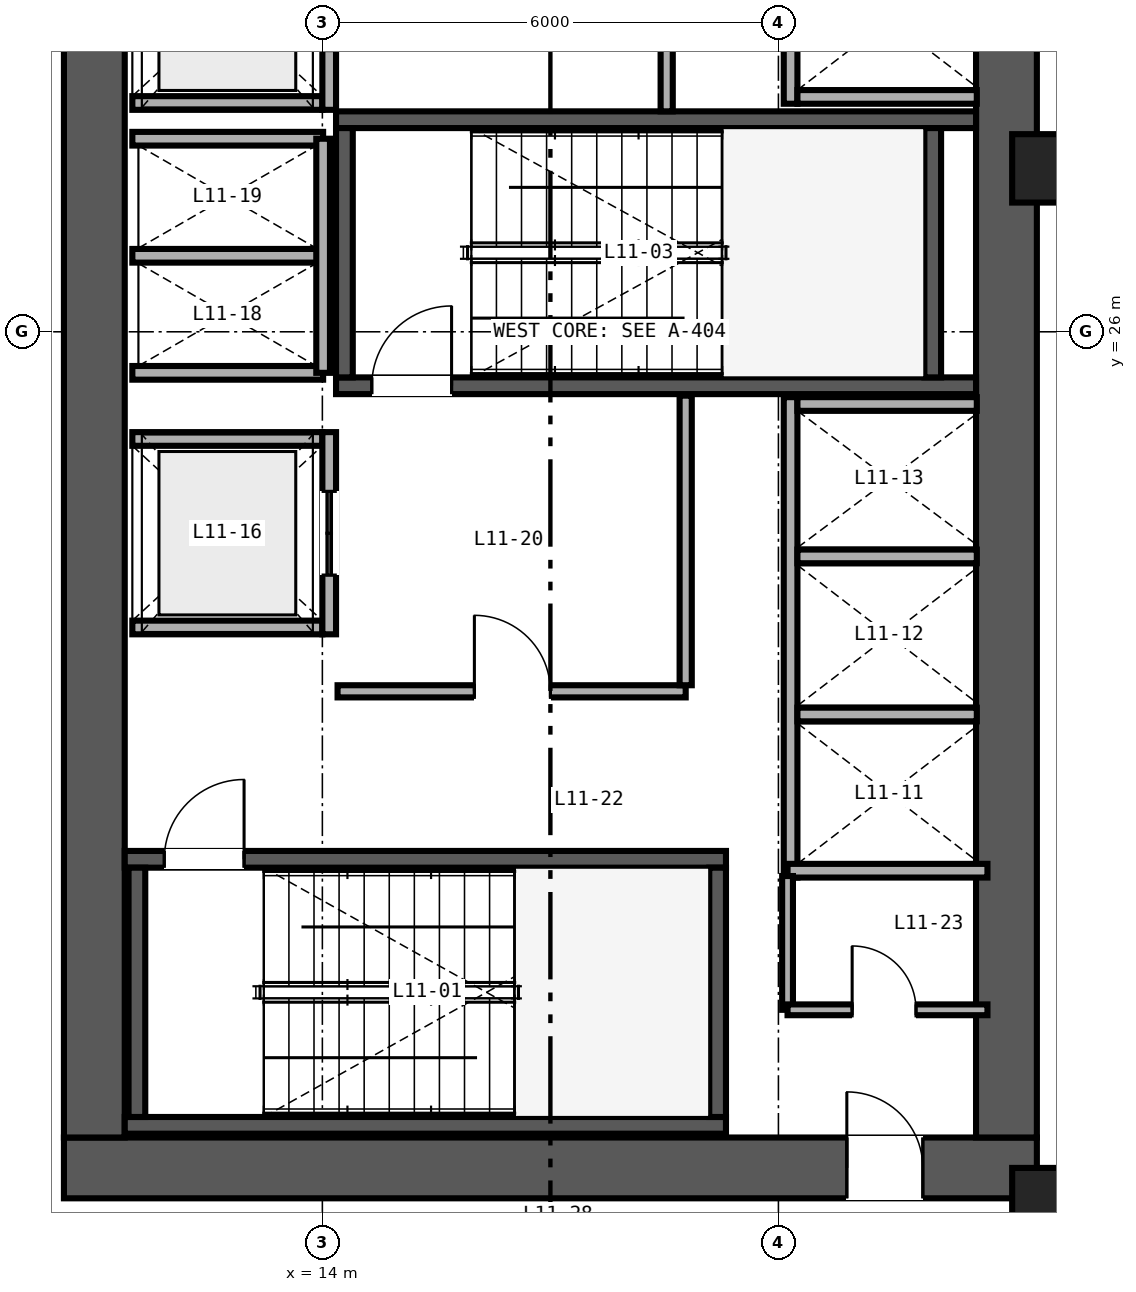
"""IFC4 building model, lengths in metres.
Left out: names, types, materials, properties, quantities, classifications, styles, units other than length and angle.
Written with IfcOpenShell. Run it as: python <this file> out.ifc"""

import sys

from ifc_helpers import new_model, si_unit, direction, frame, frame_2d, origin, origin_2d, place, context, subcontext, project, spatial, rectangle, hollow_rectangle, extrude, source, transform, mapped, element, fill, save


model = new_model("IFC4")
c1 = context("Model", 3, precision=1e-05, world=origin(), true_north=direction((0.0, 1.0)))
c2 = subcontext(c1, "Body", "Model", "MODEL_VIEW")
j1 = project(units=[si_unit("LENGTHUNIT", "METRE"), si_unit("PLANEANGLEUNIT", "RADIAN")], contexts=[c1])
p1 = place(None, origin())
s1 = spatial("IfcSite", under=j1, at=p1, CompositionType="ELEMENT")
p2 = place(p1, origin())
s2 = spatial("IfcBuilding", under=s1, at=p2, CompositionType="ELEMENT")
p3 = place(p2, frame((0.0, 0.0, 49.2)))
s3 = spatial("IfcBuildingStorey", under=s2, at=p3, CompositionType="ELEMENT", Elevation=49.2)
p4 = place(p3, frame((10.6, 15.0, 0.0), z_axis=(0.0, 0.0, 1.0), x_axis=(1.0, 0.0, 0.0)))
e1 = element("IfcWall", 1, at=p4, inside=s3, PredefinedType="SHEAR", context=c2, shape_type="SweptSolid", body=[
    extrude(rectangle(XDim=12.8, YDim=0.8, at=frame_2d((6.4, 0.0))), origin(), (0.0, 0.0, 1.0), 3.35),
])
p5 = place(p4, frame((10.3, 0.0, 0.0)))
e2 = element("IfcOpeningElement", 2, at=p5, cuts=e1, PredefinedType="OPENING", context=c2, shape_type="SweptSolid", body=[
    extrude(rectangle(XDim=1.0, YDim=2.15, at=frame_2d((0.5, 1.075))), frame((0.0, 0.41, 0.0), z_axis=(0.0, -1.0, 0.0), x_axis=(1.0, 0.0, 0.0)), (0.0, 0.0, 1.0), 0.82),
])
for number, where, z_axis, x_axis in (
    (3, (11.0, 15.4, 0.0), (0.0, 0.0, 1.0), (0.0, 1.0, 0.0)),
    (4, (23.0, 15.4, 0.0), (0.0, 0.0, 1.0), (0.0, 1.0, 0.0)),
):
    element("IfcWall", number, at=place(p3, frame(where, z_axis=z_axis, x_axis=x_axis)), inside=s3, PredefinedType="SHEAR", context=c2, shape_type="SweptSolid", body=[
        extrude(rectangle(XDim=21.2, YDim=0.8, at=frame_2d((10.6, 0.0))), origin(), (0.0, 0.0, 1.0), 3.35),
    ])
p6 = place(p3, frame((11.4, 15.56, 0.0), z_axis=(0.0, 0.0, 1.0), x_axis=(1.0, 0.0, 0.0)))
e5 = element("IfcWall", 5, at=p6, inside=s3, PredefinedType="SHEAR", context=c2, shape_type="SweptSolid", body=[
    extrude(rectangle(XDim=7.91, YDim=0.22, at=frame_2d((3.955, 0.0))), origin(), (0.0, 0.0, 1.0), 3.4),
])
p7 = place(p3, frame((11.4, 19.06, 0.0), z_axis=(0.0, 0.0, 1.0), x_axis=(1.0, 0.0, 0.0)))
e6 = element("IfcWall", 6, at=p7, inside=s3, PredefinedType="SHEAR", context=c2, shape_type="SweptSolid", body=[
    extrude(rectangle(XDim=7.91, YDim=0.22, at=frame_2d((3.955, 0.0))), origin(), (0.0, 0.0, 1.0), 3.4),
])
p8 = place(p7, frame((0.52, 0.0, 0.0)))
e7 = element("IfcOpeningElement", 7, at=p8, cuts=e6, PredefinedType="OPENING", context=c2, shape_type="SweptSolid", body=[
    extrude(rectangle(XDim=1.05, YDim=2.15, at=frame_2d((0.525, 1.075))), frame((0.0, 0.12, 0.0), z_axis=(0.0, -1.0, 0.0), x_axis=(1.0, 0.0, 0.0)), (0.0, 0.0, 1.0), 0.24),
])
for number, where, z_axis, x_axis in (
    (8, (11.56, 15.67, 0.0), (0.0, 0.0, 1.0), (0.0, 1.0, 0.0)),
    (9, (19.2, 15.67, 0.0), (0.0, 0.0, 1.0), (0.0, 1.0, 0.0)),
):
    element("IfcWall", number, at=place(p3, frame(where, z_axis=z_axis, x_axis=x_axis)), inside=s3, PredefinedType="SHEAR", context=c2, shape_type="SweptSolid", body=[
        extrude(rectangle(XDim=3.28, YDim=0.22, at=frame_2d((1.64, 0.0))), origin(), (0.0, 0.0, 1.0), 3.4),
    ])
p9 = place(p3, frame((14.18, 25.29, 0.0), z_axis=(0.0, 0.0, 1.0), x_axis=(1.0, 0.0, 0.0)))
e10 = element("IfcWall", 10, at=p9, inside=s3, PredefinedType="SHEAR", context=c2, shape_type="SweptSolid", body=[
    extrude(rectangle(XDim=8.42, YDim=0.22, at=frame_2d((4.21, 0.0))), origin(), (0.0, 0.0, 1.0), 3.4),
])
p10 = place(p9, frame((0.47, 0.0, 0.0)))
e11 = element("IfcOpeningElement", 11, at=p10, cuts=e10, PredefinedType="OPENING", context=c2, shape_type="SweptSolid", body=[
    extrude(rectangle(XDim=1.05, YDim=2.15, at=frame_2d((0.525, 1.075))), frame((0.0, 0.12, 0.0), z_axis=(0.0, -1.0, 0.0), x_axis=(1.0, 0.0, 0.0)), (0.0, 0.0, 1.0), 0.24),
])
p11 = place(p3, frame((14.18, 28.79, 0.0), z_axis=(0.0, 0.0, 1.0), x_axis=(1.0, 0.0, 0.0)))
e12 = element("IfcWall", 12, at=p11, inside=s3, PredefinedType="SHEAR", context=c2, shape_type="SweptSolid", body=[
    extrude(rectangle(XDim=8.42, YDim=0.22, at=frame_2d((4.21, 0.0))), origin(), (0.0, 0.0, 1.0), 3.4),
])
for number, where, z_axis, x_axis in (
    (13, (14.29, 25.4, 0.0), (0.0, 0.0, 1.0), (0.0, 1.0, 0.0)),
    (14, (22.03, 25.4, 0.0), (0.0, 0.0, 1.0), (0.0, 1.0, 0.0)),
):
    element("IfcWall", number, at=place(p3, frame(where, z_axis=z_axis, x_axis=x_axis)), inside=s3, PredefinedType="SHEAR", context=c2, shape_type="SweptSolid", body=[
        extrude(rectangle(XDim=3.28, YDim=0.22, at=frame_2d((1.64, 0.0))), origin(), (0.0, 0.0, 1.0), 3.4),
    ])
m1 = source(origin(), c2, "Body", "SweptSolid", [
    extrude(hollow_rectangle(XDim=0.85, YDim=0.9, WallThickness=0.04, at=origin_2d()), origin(), (0.0, 0.0, 1.0), 3.35),
])
for number, where, z_axis, x_axis in (
    (15, (23.5, 14.55, 0.0), (0.0, 0.0, 1.0), (1.0, 0.0, 0.0)),
    (16, (23.5, 28.15, 0.0), (0.0, 0.0, 1.0), (1.0, 0.0, 0.0)),
):
    element("IfcColumn", number, at=place(p3, frame(where, z_axis=z_axis, x_axis=x_axis)), inside=s3, PredefinedType="COLUMN", context=c2, shape_type="MappedRepresentation", body=[
        mapped(m1, transform((0.0, 0.0, 0.0), scale=1.0)),
    ])
p12 = place(p3, frame((20.16, 18.82, 0.0), z_axis=(0.0, 0.0, 1.0), x_axis=(0.0, 1.0, 0.0)))
e17 = element("IfcWall", 17, at=p12, inside=s3, PredefinedType="SOLIDWALL", context=c2, shape_type="SweptSolid", body=[
    extrude(rectangle(XDim=6.32, YDim=0.18, at=frame_2d((3.16, 0.0))), origin(), (0.0, 0.0, 1.0), 2.36),
])
p13 = place(p3, frame((20.12, 18.91, 0.0), z_axis=(0.0, 0.0, 1.0), x_axis=(1.0, 0.0, 0.0)))
e18 = element("IfcWall", 18, at=p13, inside=s3, PredefinedType="SOLIDWALL", context=c2, shape_type="SweptSolid", body=[
    extrude(rectangle(XDim=2.63, YDim=0.18, at=frame_2d((1.315, 0.0))), origin(), (0.0, 0.0, 1.0), 3.35),
])
p14 = place(p3, frame((20.25, 25.05, 0.0), z_axis=(0.0, 0.0, 1.0), x_axis=(1.0, 0.0, 0.0)))
e19 = element("IfcWall", 19, at=p14, inside=s3, PredefinedType="SOLIDWALL", context=c2, shape_type="SweptSolid", body=[
    extrude(rectangle(XDim=2.36, YDim=0.18, at=frame_2d((1.18, 0.0))), origin(), (0.0, 0.0, 1.0), 3.35),
])
p15 = place(p3, frame((20.25, 20.965, 0.0), z_axis=(0.0, 0.0, 1.0), x_axis=(1.0, 0.0, 0.0)))
e20 = element("IfcWall", 20, at=p15, inside=s3, PredefinedType="SOLIDWALL", context=c2, shape_type="SweptSolid", body=[
    extrude(rectangle(XDim=2.36, YDim=0.18, at=frame_2d((1.18, 0.0))), origin(), (0.0, 0.0, 1.0), 2.36),
])
p16 = place(p3, frame((20.25, 23.045, 0.0), z_axis=(0.0, 0.0, 1.0), x_axis=(1.0, 0.0, 0.0)))
e21 = element("IfcWall", 21, at=p16, inside=s3, PredefinedType="SOLIDWALL", context=c2, shape_type="SweptSolid", body=[
    extrude(rectangle(XDim=2.36, YDim=0.18, at=frame_2d((1.18, 0.0))), origin(), (0.0, 0.0, 1.0), 3.35),
])
p17 = place(p3, frame((20.16, 29.0, 0.0), z_axis=(0.0, 0.0, 1.0), x_axis=(0.0, 1.0, 0.0)))
e22 = element("IfcWall", 22, at=p17, inside=s3, PredefinedType="SOLIDWALL", context=c2, shape_type="SweptSolid", body=[
    extrude(rectangle(XDim=4.29, YDim=0.18, at=frame_2d((2.145, 0.0))), origin(), (0.0, 0.0, 1.0), 3.35),
])
p18 = place(p3, frame((20.25, 29.09, 0.0), z_axis=(0.0, 0.0, 1.0), x_axis=(1.0, 0.0, 0.0)))
e23 = element("IfcWall", 23, at=p18, inside=s3, PredefinedType="SOLIDWALL", context=c2, shape_type="SweptSolid", body=[
    extrude(rectangle(XDim=2.36, YDim=0.18, at=frame_2d((1.18, 0.0))), origin(), (0.0, 0.0, 1.0), 3.35),
])
for number, where, z_axis, x_axis in (
    (24, (11.5, 22.11, 0.0), (0.0, 0.0, 1.0), (1.0, 0.0, 0.0)),
    (25, (11.5, 24.59, 0.0), (0.0, 0.0, 1.0), (1.0, 0.0, 0.0)),
):
    element("IfcWall", number, at=place(p3, frame(where, z_axis=z_axis, x_axis=x_axis)), inside=s3, PredefinedType="SOLIDWALL", context=c2, shape_type="SweptSolid", body=[
        extrude(rectangle(XDim=2.5, YDim=0.18, at=frame_2d((1.25, 0.0))), origin(), (0.0, 0.0, 1.0), 3.35),
    ])
p19 = place(p3, frame((14.09, 22.02, 0.0), z_axis=(0.0, 0.0, 1.0), x_axis=(0.0, 1.0, 0.0)))
e26 = element("IfcWall", 26, at=p19, inside=s3, PredefinedType="SOLIDWALL", context=c2, shape_type="SweptSolid", body=[
    extrude(rectangle(XDim=2.66, YDim=0.18, at=frame_2d((1.33, 0.0))), origin(), (0.0, 0.0, 1.0), 3.35),
])
p20 = place(p19, frame((0.78, 0.0, 0.0)))
e27 = element("IfcOpeningElement", 27, at=p20, cuts=e26, PredefinedType="OPENING", context=c2, shape_type="SweptSolid", body=[
    extrude(rectangle(XDim=1.1, YDim=2.2, at=frame_2d((0.55, 1.1))), frame((0.0, 0.1, 0.0), z_axis=(0.0, -1.0, 0.0), x_axis=(1.0, 0.0, 0.0)), (0.0, 0.0, 1.0), 0.2),
])
p21 = place(p3, frame((11.5, 29.01, 0.0), z_axis=(0.0, 0.0, 1.0), x_axis=(1.0, 0.0, 0.0)))
e28 = element("IfcWall", 28, at=p21, inside=s3, PredefinedType="SOLIDWALL", context=c2, shape_type="SweptSolid", body=[
    extrude(rectangle(XDim=2.5, YDim=0.18, at=frame_2d((1.25, 0.0))), origin(), (0.0, 0.0, 1.0), 3.35),
])
p22 = place(p3, frame((14.09, 28.92, 0.0), z_axis=(0.0, 0.0, 1.0), x_axis=(0.0, 1.0, 0.0)))
e29 = element("IfcWall", 29, at=p22, inside=s3, PredefinedType="SOLIDWALL", context=c2, shape_type="SweptSolid", body=[
    extrude(rectangle(XDim=2.66, YDim=0.18, at=frame_2d((1.33, 0.0))), origin(), (0.0, 0.0, 1.0), 3.35),
])
p23 = place(p22, frame((0.78, 0.0, 0.0)))
e30 = element("IfcOpeningElement", 30, at=p23, cuts=e29, PredefinedType="OPENING", context=c2, shape_type="SweptSolid", body=[
    extrude(rectangle(XDim=1.1, YDim=2.2, at=frame_2d((0.55, 1.1))), frame((0.0, 0.1, 0.0), z_axis=(0.0, -1.0, 0.0), x_axis=(1.0, 0.0, 0.0)), (0.0, 0.0, 1.0), 0.2),
])
for number, where, z_axis, x_axis in (
    (31, (11.5, 25.46, 0.0), (0.0, 0.0, 1.0), (1.0, 0.0, 0.0)),
    (32, (11.5, 27.0, 0.0), (0.0, 0.0, 1.0), (1.0, 0.0, 0.0)),
    (33, (11.5, 28.54, 0.0), (0.0, 0.0, 1.0), (1.0, 0.0, 0.0)),
):
    element("IfcWall", number, at=place(p3, frame(where, z_axis=z_axis, x_axis=x_axis)), inside=s3, PredefinedType="SOLIDWALL", context=c2, shape_type="SweptSolid", body=[
        extrude(rectangle(XDim=2.51, YDim=0.18, at=frame_2d((1.255, 0.0))), origin(), (0.0, 0.0, 1.0), 3.35),
    ])
p24 = place(p3, frame((14.01, 25.46, 0.0), z_axis=(0.0, 0.0, 1.0), x_axis=(0.0, 1.0, 0.0)))
e34 = element("IfcWall", 34, at=p24, inside=s3, PredefinedType="SOLIDWALL", context=c2, shape_type="SweptSolid", body=[
    extrude(rectangle(XDim=3.08, YDim=0.18, at=frame_2d((1.54, 0.0))), origin(), (0.0, 0.0, 1.0), 3.35),
])
p25 = place(p3, frame((14.2, 21.27, 0.0), z_axis=(0.0, 0.0, 1.0), x_axis=(1.0, 0.0, 0.0)))
e35 = element("IfcWall", 35, at=p25, inside=s3, PredefinedType="PARTITIONING", context=c2, shape_type="SweptSolid", body=[
    extrude(rectangle(XDim=4.58, YDim=0.16, at=frame_2d((2.29, 0.0))), origin(), (0.0, 0.0, 1.0), 3.35),
])
p26 = place(p25, frame((1.8, 0.0, 0.0)))
e36 = element("IfcOpeningElement", 36, at=p26, cuts=e35, PredefinedType="OPENING", context=c2, shape_type="SweptSolid", body=[
    extrude(rectangle(XDim=1.0, YDim=2.15, at=frame_2d((0.5, 1.075))), frame((0.0, 0.09, 0.0), z_axis=(0.0, -1.0, 0.0), x_axis=(1.0, 0.0, 0.0)), (0.0, 0.0, 1.0), 0.18),
])
p27 = place(p3, frame((18.78, 21.35, 0.0), z_axis=(0.0, 0.0, 1.0), x_axis=(0.0, 1.0, 0.0)))
e37 = element("IfcWall", 37, at=p27, inside=s3, PredefinedType="PARTITIONING", context=c2, shape_type="SweptSolid", body=[
    extrude(rectangle(XDim=3.81, YDim=0.16, at=frame_2d((1.905, 0.0))), origin(), (0.0, 0.0, 1.0), 3.35),
])
p28 = place(p3, frame((18.53, 28.9, 0.0), z_axis=(0.0, 0.0, 1.0), x_axis=(0.0, 1.0, 0.0)))
e38 = element("IfcWall", 38, at=p28, inside=s3, PredefinedType="PARTITIONING", context=c2, shape_type="SweptSolid", body=[
    extrude(rectangle(XDim=3.9, YDim=0.16, at=frame_2d((1.95, 0.0))), origin(), (0.0, 0.0, 1.0), 3.35),
])
p29 = place(p28, frame((1.5, 0.0, 0.0)))
e39 = element("IfcOpeningElement", 39, at=p29, cuts=e38, PredefinedType="OPENING", context=c2, shape_type="SweptSolid", body=[
    extrude(rectangle(XDim=1.0, YDim=2.15, at=frame_2d((0.5, 1.075))), frame((0.0, 0.09, 0.0), z_axis=(0.0, -1.0, 0.0), x_axis=(1.0, 0.0, 0.0)), (0.0, 0.0, 1.0), 0.18),
])
p30 = place(p3, frame((20.12, 17.08, 0.0), z_axis=(0.0, 0.0, 1.0), x_axis=(0.0, 1.0, 0.0)))
e40 = element("IfcWall", 40, at=p30, inside=s3, PredefinedType="PARTITIONING", context=c2, shape_type="SweptSolid", body=[
    extrude(rectangle(XDim=1.76, YDim=0.142, at=frame_2d((0.88, 0.0))), origin(), (0.0, 0.0, 1.0), 3.35),
])
p31 = place(p3, frame((20.12, 17.08, 0.0), z_axis=(0.0, 0.0, 1.0), x_axis=(1.0, 0.0, 0.0)))
e41 = element("IfcWall", 41, at=p31, inside=s3, PredefinedType="PARTITIONING", context=c2, shape_type="SweptSolid", body=[
    extrude(rectangle(XDim=2.63, YDim=0.142, at=frame_2d((1.315, 0.0))), origin(), (0.0, 0.0, 1.0), 3.35),
])
p32 = place(p31, frame((0.85, 0.0, 0.0)))
e42 = element("IfcOpeningElement", 42, at=p32, cuts=e41, PredefinedType="OPENING", context=c2, shape_type="SweptSolid", body=[
    extrude(rectangle(XDim=0.84, YDim=2.1, at=frame_2d((0.42, 1.05))), frame((0.0, 0.081, 0.0), z_axis=(0.0, -1.0, 0.0), x_axis=(1.0, 0.0, 0.0)), (0.0, 0.0, 1.0), 0.162),
])
m2 = source(origin(), c2, "Body", "SweptSolid", [
    extrude(rectangle(XDim=1.05, YDim=2.15, at=frame_2d((0.525, 1.075))), frame((0.0, 0.025, 0.0), z_axis=(0.0, -1.0, 0.0), x_axis=(1.0, 0.0, 0.0)), (0.0, 0.0, 1.0), 0.05),
])
p33 = place(p8, origin())
e43 = element("IfcDoor", 43, at=p33, inside=s3, OperationType="SINGLE_SWING_RIGHT", PredefinedType="DOOR", context=c2, shape_type="MappedRepresentation", body=[
    mapped(m2, transform((0.0, 0.0, 0.0), scale=1.0)),
])
fill(e7, e43)
p34 = place(p10, origin())
e44 = element("IfcDoor", 44, at=p34, inside=s3, OperationType="SINGLE_SWING_RIGHT", PredefinedType="DOOR", context=c2, shape_type="MappedRepresentation", body=[
    mapped(m2, transform((0.0, 0.0, 0.0), scale=1.0)),
])
fill(e11, e44)
m3 = source(origin(), c2, "Body", "SweptSolid", [
    extrude(rectangle(XDim=1.1, YDim=2.2, at=frame_2d((0.55, 1.1))), frame((0.0, 0.025, 0.0), z_axis=(0.0, -1.0, 0.0), x_axis=(1.0, 0.0, 0.0)), (0.0, 0.0, 1.0), 0.05),
])
p35 = place(p20, origin())
e45 = element("IfcDoor", 45, at=p35, inside=s3, OperationType="DOUBLE_DOOR_SLIDING", PredefinedType="DOOR", context=c2, shape_type="MappedRepresentation", body=[
    mapped(m3, transform((0.0, 0.0, 0.0), scale=1.0)),
])
fill(e27, e45)
m4 = source(origin(), c2, "Body", "SweptSolid", [
    extrude(rectangle(XDim=1.0, YDim=2.15, at=frame_2d((0.5, 1.075))), frame((0.0, 0.025, 0.0), z_axis=(0.0, -1.0, 0.0), x_axis=(1.0, 0.0, 0.0)), (0.0, 0.0, 1.0), 0.05),
])
p36 = place(p26, origin())
e46 = element("IfcDoor", 46, at=p36, inside=s3, OperationType="SINGLE_SWING_LEFT", PredefinedType="DOOR", context=c2, shape_type="MappedRepresentation", body=[
    mapped(m4, transform((0.0, 0.0, 0.0), scale=1.0)),
])
fill(e36, e46)
m5 = source(origin(), c2, "Body", "SweptSolid", [
    extrude(rectangle(XDim=0.84, YDim=2.1, at=frame_2d((0.42, 1.05))), frame((0.0, 0.025, 0.0), z_axis=(0.0, -1.0, 0.0), x_axis=(1.0, 0.0, 0.0)), (0.0, 0.0, 1.0), 0.05),
])
p37 = place(p32, origin())
e47 = element("IfcDoor", 47, at=p37, inside=s3, OperationType="SINGLE_SWING_LEFT", PredefinedType="DOOR", context=c2, shape_type="MappedRepresentation", body=[
    mapped(m5, transform((0.0, 0.0, 0.0), scale=1.0)),
])
fill(e42, e47)
p38 = place(p5, origin())
e48 = element("IfcDoor", 48, at=p38, inside=s3, OperationType="SINGLE_SWING_LEFT", PredefinedType="DOOR", context=c2, shape_type="MappedRepresentation", body=[
    mapped(m4, transform((0.0, 0.0, 0.0), scale=1.0)),
])
fill(e2, e48)
save(model, sys.argv[1])
